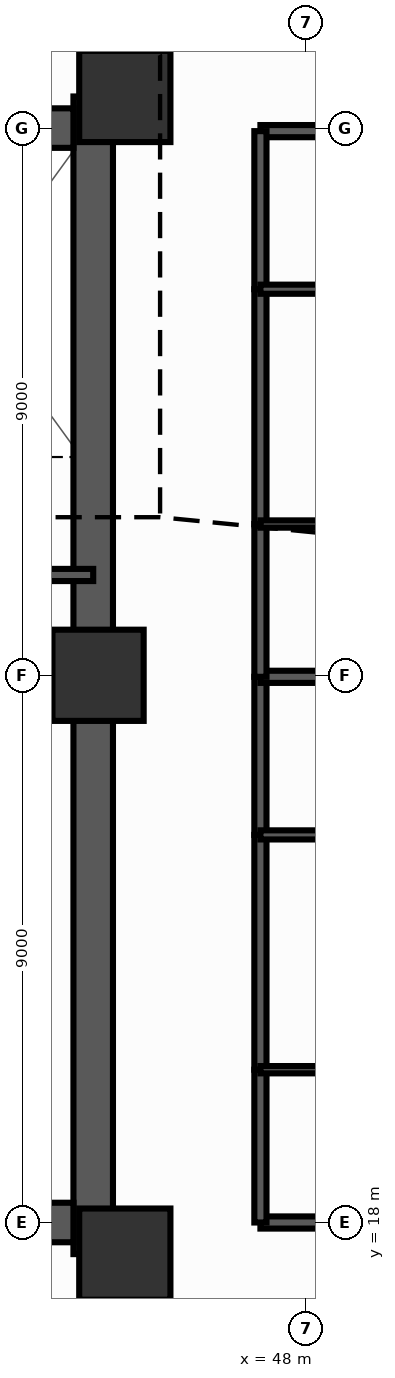
"""IFC4 building model, lengths in metres.
Left out: names, types, materials, properties, quantities, classifications, styles, units other than length and angle.
Written with IfcOpenShell. Run it as: python <this file> out.ifc"""

import sys

from ifc_helpers import new_model, si_unit, direction, frame, frame_2d, origin, origin_2d, place, context, subcontext, project, spatial, rectangle, extrude, source, transform, mapped, element, fill, save


model = new_model("IFC4")
c1 = context("Model", 3, precision=1e-05, world=origin(), true_north=direction((0.0, 1.0)))
c2 = subcontext(c1, "Body", "Model", "MODEL_VIEW")
j1 = project(units=[si_unit("LENGTHUNIT", "METRE"), si_unit("PLANEANGLEUNIT", "RADIAN")], contexts=[c1])
p1 = place(None, origin())
s1 = spatial("IfcSite", under=j1, at=p1, CompositionType="ELEMENT")
p2 = place(p1, origin())
s2 = spatial("IfcBuilding", under=s1, at=p2, CompositionType="ELEMENT")
p3 = place(p2, frame((0.0, 0.0, 19.4)))
s3 = spatial("IfcBuildingStorey", under=s2, at=p3, CompositionType="ELEMENT", Elevation=19.4)
p4 = place(p3, frame((44.5, 17.48, 0.0), z_axis=(0.0, 0.0, 1.0), x_axis=(0.0, 1.0, 0.0)))
e1 = element("IfcWall", 1, at=p4, inside=s3, PredefinedType="SHEAR", context=c2, shape_type="SweptSolid", body=[
    extrude(rectangle(XDim=19.04, YDim=0.65, at=frame_2d((9.52, 0.0))), origin(), (0.0, 0.0, 1.0), 3.0),
])
p5 = place(p4, frame((12.67, 0.0, 0.0), z_axis=(0.0, 0.0, 1.0), x_axis=(-1.0, 0.0, 0.0)))
e2 = element("IfcOpeningElement", 2, at=p5, cuts=e1, PredefinedType="OPENING", context=c2, shape_type="SweptSolid", body=[
    extrude(rectangle(XDim=1.1, YDim=2.15, at=frame_2d((0.55, 1.075))), frame((0.0, 0.337, 0.0), z_axis=(0.0, -1.0, 0.0), x_axis=(1.0, 0.0, 0.0)), (0.0, 0.0, 1.0), 0.674),
])
p6 = place(p3, frame((31.825, 18.0, 0.0), z_axis=(0.0, 0.0, 1.0), x_axis=(1.0, 0.0, 0.0)))
e3 = element("IfcWall", 3, at=p6, inside=s3, PredefinedType="SHEAR", context=c2, shape_type="SweptSolid", body=[
    extrude(rectangle(XDim=12.35, YDim=0.65, at=frame_2d((6.175, 0.0))), origin(), (0.0, 0.0, 1.0), 3.0),
])
p7 = place(p3, frame((31.825, 36.0, 0.0), z_axis=(0.0, 0.0, 1.0), x_axis=(1.0, 0.0, 0.0)))
e4 = element("IfcWall", 4, at=p7, inside=s3, PredefinedType="SHEAR", context=c2, shape_type="SweptSolid", body=[
    extrude(rectangle(XDim=12.35, YDim=0.65, at=frame_2d((6.175, 0.0))), origin(), (0.0, 0.0, 1.0), 3.0),
])
p8 = place(p7, frame((5.125, 0.0, 0.0), z_axis=(0.0, 0.0, 1.0), x_axis=(-1.0, 0.0, 0.0)))
e5 = element("IfcOpeningElement", 5, at=p8, cuts=e4, PredefinedType="OPENING", context=c2, shape_type="SweptSolid", body=[
    extrude(rectangle(XDim=1.4, YDim=2.15, at=frame_2d((0.7, 1.075))), frame((0.0, 0.337, 0.0), z_axis=(0.0, -1.0, 0.0), x_axis=(1.0, 0.0, 0.0)), (0.0, 0.0, 1.0), 0.674),
])
m1 = source(origin(), c2, "Body", "SweptSolid", [
    extrude(rectangle(XDim=1.5, YDim=1.5, at=origin_2d()), origin(), (0.0, 0.0, 1.0), 3.0),
])
for number, where, z_axis, x_axis in (
    (6, (45.02, 17.48, 0.0), (0.0, 0.0, 1.0), (1.0, 0.0, 0.0)),
    (7, (45.02, 36.52, 0.0), (0.0, 0.0, 1.0), (1.0, 0.0, 0.0)),
    (8, (44.58, 27.0, 0.0), (0.0, 0.0, 1.0), (1.0, 0.0, 0.0)),
):
    element("IfcColumn", number, at=place(p3, frame(where, z_axis=z_axis, x_axis=x_axis)), inside=s3, PredefinedType="COLUMN", context=c2, shape_type="MappedRepresentation", body=[
        mapped(m1, transform((0.0, 0.0, 0.0), scale=1.0)),
    ])
p9 = place(p3, frame((40.57, 28.65, 0.0), z_axis=(0.0, 0.0, 1.0), x_axis=(1.0, 0.0, 0.0)))
e9 = element("IfcWall", 9, at=p9, inside=s3, PredefinedType="SOLIDWALL", context=c2, shape_type="SweptSolid", body=[
    extrude(rectangle(XDim=3.93, YDim=0.2, at=frame_2d((1.965, 0.0))), origin(), (0.0, 0.0, 1.0), 2.79),
])
for number, where, z_axis, x_axis in (
    (10, (47.25, 18.0, 0.0), (0.0, 0.0, 1.0), (1.0, 0.0, 0.0)),
    (11, (47.25, 35.95, 0.0), (0.0, 0.0, 1.0), (1.0, 0.0, 0.0)),
):
    element("IfcWall", number, at=place(p3, frame(where, z_axis=z_axis, x_axis=x_axis)), inside=s3, PredefinedType="PARTITIONING", context=c2, shape_type="SweptSolid", body=[
        extrude(rectangle(XDim=16.6, YDim=0.2, at=frame_2d((8.3, 0.0))), origin(), (0.0, 0.0, 1.0), 2.24),
    ])
p10 = place(p3, frame((47.25, 18.0, 0.0), z_axis=(0.0, 0.0, 1.0), x_axis=(0.0, 1.0, 0.0)))
e12 = element("IfcWall", 12, at=p10, inside=s3, PredefinedType="PARTITIONING", context=c2, shape_type="SweptSolid", body=[
    extrude(rectangle(XDim=2.513, YDim=0.2, at=frame_2d((1.256, 0.0))), origin(), (0.0, 0.0, 1.0), 2.79),
])
p11 = place(p3, frame((47.25, 20.513, 0.0), z_axis=(0.0, 0.0, 1.0), x_axis=(0.0, 1.0, 0.0)))
e13 = element("IfcWall", 13, at=p11, inside=s3, PredefinedType="PARTITIONING", context=c2, shape_type="SweptSolid", body=[
    extrude(rectangle(XDim=3.862, YDim=0.2, at=frame_2d((1.931, 0.0))), origin(), (0.0, 0.0, 1.0), 2.79),
])
p12 = place(p11, frame((1.431, 0.0, 0.0)))
e14 = element("IfcOpeningElement", 14, at=p12, cuts=e13, PredefinedType="OPENING", context=c2, shape_type="SweptSolid", body=[
    extrude(rectangle(XDim=1.0, YDim=2.15, at=frame_2d((0.5, 1.075))), frame((0.0, 0.112, 0.0), z_axis=(0.0, -1.0, 0.0), x_axis=(1.0, 0.0, 0.0)), (0.0, 0.0, 1.0), 0.224),
])
p13 = place(p3, frame((47.25, 24.375, 0.0), z_axis=(0.0, 0.0, 1.0), x_axis=(0.0, 1.0, 0.0)))
e15 = element("IfcWall", 15, at=p13, inside=s3, PredefinedType="PARTITIONING", context=c2, shape_type="SweptSolid", body=[
    extrude(rectangle(XDim=2.6, YDim=0.2, at=frame_2d((1.3, 0.0))), origin(), (0.0, 0.0, 1.0), 2.79),
])
p14 = place(p3, frame((47.25, 20.513, 0.0), z_axis=(0.0, 0.0, 1.0), x_axis=(1.0, 0.0, 0.0)))
e16 = element("IfcWall", 16, at=p14, inside=s3, PredefinedType="PARTITIONING", context=c2, shape_type="SweptSolid", body=[
    extrude(rectangle(XDim=2.12, YDim=0.12, at=frame_2d((1.06, 0.0))), origin(), (0.0, 0.0, 1.0), 2.79),
])
p15 = place(p14, frame((0.635, 0.0, 0.0)))
e17 = element("IfcOpeningElement", 17, at=p15, cuts=e16, PredefinedType="OPENING", context=c2, shape_type="SweptSolid", body=[
    extrude(rectangle(XDim=0.85, YDim=2.05, at=frame_2d((0.425, 1.025))), frame((0.0, 0.072, 0.0), z_axis=(0.0, -1.0, 0.0), x_axis=(1.0, 0.0, 0.0)), (0.0, 0.0, 1.0), 0.144),
])
p16 = place(p3, frame((47.25, 24.375, 0.0), z_axis=(0.0, 0.0, 1.0), x_axis=(1.0, 0.0, 0.0)))
e18 = element("IfcWall", 18, at=p16, inside=s3, PredefinedType="PARTITIONING", context=c2, shape_type="SweptSolid", body=[
    extrude(rectangle(XDim=3.07, YDim=0.15, at=frame_2d((1.535, 0.0))), origin(), (0.0, 0.0, 1.0), 2.79),
])
p17 = place(p16, frame((1.085, 0.0, 0.0)))
e19 = element("IfcOpeningElement", 19, at=p17, cuts=e18, PredefinedType="OPENING", context=c2, shape_type="SweptSolid", body=[
    extrude(rectangle(XDim=0.9, YDim=2.1, at=frame_2d((0.45, 1.05))), frame((0.0, 0.087, 0.0), z_axis=(0.0, -1.0, 0.0), x_axis=(1.0, 0.0, 0.0)), (0.0, 0.0, 1.0), 0.174),
])
p18 = place(p3, frame((47.25, 26.975, 0.0), z_axis=(0.0, 0.0, 1.0), x_axis=(1.0, 0.0, 0.0)))
e20 = element("IfcWall", 20, at=p18, inside=s3, PredefinedType="PARTITIONING", context=c2, shape_type="SweptSolid", body=[
    extrude(rectangle(XDim=16.6, YDim=0.2, at=frame_2d((8.3, 0.0))), origin(), (0.0, 0.0, 1.0), 2.79),
])
p19 = place(p3, frame((47.25, 26.975, 0.0), z_axis=(0.0, 0.0, 1.0), x_axis=(0.0, 1.0, 0.0)))
e21 = element("IfcWall", 21, at=p19, inside=s3, PredefinedType="PARTITIONING", context=c2, shape_type="SweptSolid", body=[
    extrude(rectangle(XDim=2.513, YDim=0.2, at=frame_2d((1.256, 0.0))), origin(), (0.0, 0.0, 1.0), 2.79),
])
p20 = place(p3, frame((47.25, 29.488, 0.0), z_axis=(0.0, 0.0, 1.0), x_axis=(0.0, 1.0, 0.0)))
e22 = element("IfcWall", 22, at=p20, inside=s3, PredefinedType="PARTITIONING", context=c2, shape_type="SweptSolid", body=[
    extrude(rectangle(XDim=3.862, YDim=0.2, at=frame_2d((1.931, 0.0))), origin(), (0.0, 0.0, 1.0), 2.79),
])
p21 = place(p20, frame((1.431, 0.0, 0.0)))
e23 = element("IfcOpeningElement", 23, at=p21, cuts=e22, PredefinedType="OPENING", context=c2, shape_type="SweptSolid", body=[
    extrude(rectangle(XDim=1.0, YDim=2.15, at=frame_2d((0.5, 1.075))), frame((0.0, 0.112, 0.0), z_axis=(0.0, -1.0, 0.0), x_axis=(1.0, 0.0, 0.0)), (0.0, 0.0, 1.0), 0.224),
])
p22 = place(p3, frame((47.25, 33.35, 0.0), z_axis=(0.0, 0.0, 1.0), x_axis=(0.0, 1.0, 0.0)))
e24 = element("IfcWall", 24, at=p22, inside=s3, PredefinedType="PARTITIONING", context=c2, shape_type="SweptSolid", body=[
    extrude(rectangle(XDim=2.6, YDim=0.2, at=frame_2d((1.3, 0.0))), origin(), (0.0, 0.0, 1.0), 2.79),
])
p23 = place(p3, frame((47.25, 29.488, 0.0), z_axis=(0.0, 0.0, 1.0), x_axis=(1.0, 0.0, 0.0)))
e25 = element("IfcWall", 25, at=p23, inside=s3, PredefinedType="PARTITIONING", context=c2, shape_type="SweptSolid", body=[
    extrude(rectangle(XDim=2.12, YDim=0.12, at=frame_2d((1.06, 0.0))), origin(), (0.0, 0.0, 1.0), 2.79),
])
p24 = place(p23, frame((0.635, 0.0, 0.0)))
e26 = element("IfcOpeningElement", 26, at=p24, cuts=e25, PredefinedType="OPENING", context=c2, shape_type="SweptSolid", body=[
    extrude(rectangle(XDim=0.85, YDim=2.05, at=frame_2d((0.425, 1.025))), frame((0.0, 0.072, 0.0), z_axis=(0.0, -1.0, 0.0), x_axis=(1.0, 0.0, 0.0)), (0.0, 0.0, 1.0), 0.144),
])
p25 = place(p3, frame((47.25, 33.35, 0.0), z_axis=(0.0, 0.0, 1.0), x_axis=(1.0, 0.0, 0.0)))
e27 = element("IfcWall", 27, at=p25, inside=s3, PredefinedType="PARTITIONING", context=c2, shape_type="SweptSolid", body=[
    extrude(rectangle(XDim=3.07, YDim=0.15, at=frame_2d((1.535, 0.0))), origin(), (0.0, 0.0, 1.0), 2.79),
])
p26 = place(p25, frame((1.085, 0.0, 0.0)))
e28 = element("IfcOpeningElement", 28, at=p26, cuts=e27, PredefinedType="OPENING", context=c2, shape_type="SweptSolid", body=[
    extrude(rectangle(XDim=0.9, YDim=2.1, at=frame_2d((0.45, 1.05))), frame((0.0, 0.087, 0.0), z_axis=(0.0, -1.0, 0.0), x_axis=(1.0, 0.0, 0.0)), (0.0, 0.0, 1.0), 0.174),
])
m2 = source(origin(), c2, "Body", "SweptSolid", [
    extrude(rectangle(XDim=1.1, YDim=2.15, at=frame_2d((0.55, 1.075))), frame((0.0, 0.025, 0.0), z_axis=(0.0, -1.0, 0.0), x_axis=(1.0, 0.0, 0.0)), (0.0, 0.0, 1.0), 0.05),
])
p27 = place(p5, origin())
e29 = element("IfcDoor", 29, at=p27, inside=s3, OperationType="SINGLE_SWING_RIGHT", PredefinedType="DOOR", context=c2, shape_type="MappedRepresentation", body=[
    mapped(m2, transform((0.0, 0.0, 0.0), scale=1.0)),
])
fill(e2, e29)
m3 = source(origin(), c2, "Body", "SweptSolid", [
    extrude(rectangle(XDim=1.0, YDim=2.15, at=frame_2d((0.5, 1.075))), frame((0.0, 0.025, 0.0), z_axis=(0.0, -1.0, 0.0), x_axis=(1.0, 0.0, 0.0)), (0.0, 0.0, 1.0), 0.05),
])
p28 = place(p12, origin())
e30 = element("IfcDoor", 30, at=p28, inside=s3, OperationType="SINGLE_SWING_RIGHT", PredefinedType="DOOR", context=c2, shape_type="MappedRepresentation", body=[
    mapped(m3, transform((0.0, 0.0, 0.0), scale=1.0)),
])
fill(e14, e30)
m4 = source(origin(), c2, "Body", "SweptSolid", [
    extrude(rectangle(XDim=0.85, YDim=2.05, at=frame_2d((0.425, 1.025))), frame((0.0, 0.025, 0.0), z_axis=(0.0, -1.0, 0.0), x_axis=(1.0, 0.0, 0.0)), (0.0, 0.0, 1.0), 0.05),
])
p29 = place(p15, origin())
e31 = element("IfcDoor", 31, at=p29, inside=s3, OperationType="SINGLE_SWING_LEFT", PredefinedType="DOOR", context=c2, shape_type="MappedRepresentation", body=[
    mapped(m4, transform((0.0, 0.0, 0.0), scale=1.0)),
])
fill(e17, e31)
p30 = place(p21, origin())
e32 = element("IfcDoor", 32, at=p30, inside=s3, OperationType="SINGLE_SWING_LEFT", PredefinedType="DOOR", context=c2, shape_type="MappedRepresentation", body=[
    mapped(m3, transform((0.0, 0.0, 0.0), scale=1.0)),
])
fill(e23, e32)
p31 = place(p24, origin())
e33 = element("IfcDoor", 33, at=p31, inside=s3, OperationType="SINGLE_SWING_RIGHT", PredefinedType="DOOR", context=c2, shape_type="MappedRepresentation", body=[
    mapped(m4, transform((0.0, 0.0, 0.0), scale=1.0)),
])
fill(e26, e33)
save(model, sys.argv[1])
